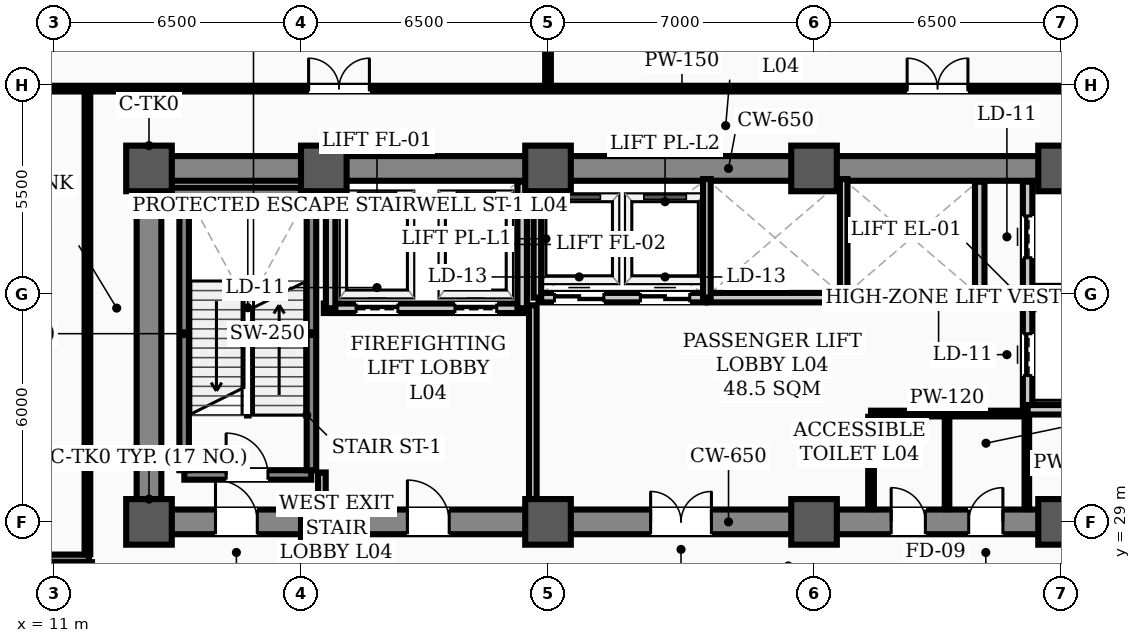
"""IFC4 building model, lengths in metres.
Left out: names, types, materials, properties, quantities, classifications, styles, units other than length and angle.
Written with IfcOpenShell. Run it as: python <this file> out.ifc"""

import sys

from ifc_helpers import new_model, si_unit, direction, frame, frame_2d, origin, origin_2d, place, context, subcontext, project, spatial, rectangle, hollow_rectangle, extrude, element, fill, save


model = new_model("IFC4")
c1 = context("Model", 3, precision=1e-05, world=origin(), true_north=direction((0.0, 1.0)))
c2 = subcontext(c1, "Body", "Model", "MODEL_VIEW")
j1 = project(units=[si_unit("LENGTHUNIT", "METRE"), si_unit("PLANEANGLEUNIT", "RADIAN")], contexts=[c1])
p1 = place(None, origin())
s1 = spatial("IfcSite", under=j1, at=p1, CompositionType="ELEMENT")
p2 = place(p1, origin())
s2 = spatial("IfcBuilding", under=s1, at=p2, CompositionType="ELEMENT")
p3 = place(p2, frame((0.0, 0.0, 16.6)))
s3 = spatial("IfcBuildingStorey", under=s2, at=p3, CompositionType="ELEMENT", Elevation=16.6)
for number, where, z_axis, x_axis in (
    (1, (13.5, 29.0, 0.0), (0.0, 0.0, 1.0), (1.0, 0.0, 0.0)),
    (2, (13.5, 38.3, 0.0), (0.0, 0.0, 1.0), (1.0, 0.0, 0.0)),
    (3, (18.1, 29.0, 0.0), (0.0, 0.0, 1.0), (1.0, 0.0, 0.0)),
    (4, (18.1, 38.3, 0.0), (0.0, 0.0, 1.0), (1.0, 0.0, 0.0)),
    (5, (24.0, 29.0, 0.0), (0.0, 0.0, 1.0), (1.0, 0.0, 0.0)),
    (6, (24.0, 38.3, 0.0), (0.0, 0.0, 1.0), (1.0, 0.0, 0.0)),
    (7, (31.0, 29.0, 0.0), (0.0, 0.0, 1.0), (1.0, 0.0, 0.0)),
    (8, (31.0, 38.3, 0.0), (0.0, 0.0, 1.0), (1.0, 0.0, 0.0)),
    (9, (37.5, 29.0, 0.0), (0.0, 0.0, 1.0), (1.0, 0.0, 0.0)),
    (10, (37.5, 38.3, 0.0), (0.0, 0.0, 1.0), (1.0, 0.0, 0.0)),
):
    element("IfcColumn", number, at=place(p3, frame(where, z_axis=z_axis, x_axis=x_axis)), inside=s3, PredefinedType="COLUMN", context=c2, shape_type="SweptSolid", body=[
        extrude(hollow_rectangle(XDim=1.2, YDim=1.2, WallThickness=0.04, InnerFilletRadius=0.02, OuterFilletRadius=0.06, at=origin_2d()), origin(), (0.0, 0.0, 1.0), 5.4),
    ])
p4 = place(p3, frame((13.5, 29.0, 0.0), z_axis=(0.0, 0.0, 1.0), x_axis=(1.0, 0.0, 0.0)))
e11 = element("IfcWall", 11, at=p4, inside=s3, PredefinedType="SHEAR", context=c2, shape_type="SweptSolid", body=[
    extrude(rectangle(XDim=30.5, YDim=0.65, at=frame_2d((15.25, 0.0))), origin(), (0.0, 0.0, 1.0), 5.16),
])
p5 = place(p4, frame((1.75, 0.0, 0.0)))
e12 = element("IfcOpeningElement", 12, at=p5, cuts=e11, PredefinedType="OPENING", context=c2, shape_type="SweptSolid", body=[
    extrude(rectangle(XDim=1.1, YDim=2.08, at=frame_2d((0.55, 1.04))), frame((0.0, 0.335, 0.0), z_axis=(0.0, -1.0, 0.0), x_axis=(1.0, 0.0, 0.0)), (0.0, 0.0, 1.0), 0.67),
])
p6 = place(p4, frame((26.7, 0.0, 0.0)))
e13 = element("IfcOpeningElement", 13, at=p6, cuts=e11, PredefinedType="OPENING", context=c2, shape_type="SweptSolid", body=[
    extrude(rectangle(XDim=1.1, YDim=2.08, at=frame_2d((0.55, 1.04))), frame((0.0, 0.335, 0.0), z_axis=(0.0, -1.0, 0.0), x_axis=(1.0, 0.0, 0.0)), (0.0, 0.0, 1.0), 0.67),
])
p7 = place(p4, frame((6.8, 0.0, 0.0)))
e14 = element("IfcOpeningElement", 14, at=p7, cuts=e11, PredefinedType="OPENING", context=c2, shape_type="SweptSolid", body=[
    extrude(rectangle(XDim=1.1, YDim=2.08, at=frame_2d((0.55, 1.04))), frame((0.0, 0.335, 0.0), z_axis=(0.0, -1.0, 0.0), x_axis=(1.0, 0.0, 0.0)), (0.0, 0.0, 1.0), 0.67),
])
p8 = place(p4, frame((13.2, 0.0, 0.0)))
e15 = element("IfcOpeningElement", 15, at=p8, cuts=e11, PredefinedType="OPENING", context=c2, shape_type="SweptSolid", body=[
    extrude(rectangle(XDim=1.6, YDim=2.08, at=frame_2d((0.8, 1.04))), frame((0.0, 0.335, 0.0), z_axis=(0.0, -1.0, 0.0), x_axis=(1.0, 0.0, 0.0)), (0.0, 0.0, 1.0), 0.67),
])
p9 = place(p4, frame((19.53, 0.0, 0.0)))
e16 = element("IfcOpeningElement", 16, at=p9, cuts=e11, PredefinedType="OPENING", context=c2, shape_type="SweptSolid", body=[
    extrude(rectangle(XDim=0.9, YDim=2.08, at=frame_2d((0.45, 1.04))), frame((0.0, 0.335, 0.0), z_axis=(0.0, -1.0, 0.0), x_axis=(1.0, 0.0, 0.0)), (0.0, 0.0, 1.0), 0.67),
])
p10 = place(p4, frame((21.57, 0.0, 0.0)))
e17 = element("IfcOpeningElement", 17, at=p10, cuts=e11, PredefinedType="OPENING", context=c2, shape_type="SweptSolid", body=[
    extrude(rectangle(XDim=0.9, YDim=2.08, at=frame_2d((0.45, 1.04))), frame((0.0, 0.335, 0.0), z_axis=(0.0, -1.0, 0.0), x_axis=(1.0, 0.0, 0.0)), (0.0, 0.0, 1.0), 0.67),
])
p11 = place(p3, frame((13.5, 38.3, 0.0), z_axis=(0.0, 0.0, 1.0), x_axis=(1.0, 0.0, 0.0)))
e18 = element("IfcWall", 18, at=p11, inside=s3, PredefinedType="SHEAR", context=c2, shape_type="SweptSolid", body=[
    extrude(rectangle(XDim=30.5, YDim=0.65, at=frame_2d((15.25, 0.0))), origin(), (0.0, 0.0, 1.0), 5.16),
])
p12 = place(p3, frame((13.5, 29.35, 0.0), z_axis=(0.0, 0.0, 1.0), x_axis=(0.0, 1.0, 0.0)))
e19 = element("IfcWall", 19, at=p12, inside=s3, PredefinedType="SHEAR", context=c2, shape_type="SweptSolid", body=[
    extrude(rectangle(XDim=8.6, YDim=0.65, at=frame_2d((4.3, 0.0))), origin(), (0.0, 0.0, 1.0), 5.16),
])
p13 = place(p3, frame((14.43, 30.235, 0.0), z_axis=(0.0, 0.0, 1.0), x_axis=(1.0, 0.0, 0.0)))
e20 = element("IfcWall", 20, at=p13, inside=s3, PredefinedType="STANDARD", context=c2, shape_type="SweptSolid", body=[
    extrude(rectangle(XDim=3.34, YDim=0.25, at=frame_2d((1.67, 0.0))), origin(), (0.0, 0.0, 1.0), 5.16),
])
p14 = place(p13, frame((1.1, 0.0, 0.0)))
e21 = element("IfcOpeningElement", 21, at=p14, cuts=e20, PredefinedType="OPENING", context=c2, shape_type="SweptSolid", body=[
    extrude(rectangle(XDim=1.1, YDim=2.08, at=frame_2d((0.55, 1.04))), frame((0.0, 0.135, 0.0), z_axis=(0.0, -1.0, 0.0), x_axis=(1.0, 0.0, 0.0)), (0.0, 0.0, 1.0), 0.27),
])
p15 = place(p3, frame((14.1, 37.669, 0.0), z_axis=(0.0, 0.0, 1.0), x_axis=(1.0, 0.0, 0.0)))
e22 = element("IfcWall", 22, at=p15, inside=s3, PredefinedType="STANDARD", context=c2, shape_type="SweptSolid", body=[
    extrude(rectangle(XDim=3.67, YDim=0.25, at=frame_2d((1.835, 0.0))), origin(), (0.0, 0.0, 1.0), 5.16),
])
for number, where, z_axis, x_axis in (
    (23, (14.425, 30.36, 0.0), (0.0, 0.0, 1.0), (0.0, 1.0, 0.0)),
    (24, (17.775, 30.36, 0.0), (0.0, 0.0, 1.0), (0.0, 1.0, 0.0)),
):
    element("IfcWall", number, at=place(p3, frame(where, z_axis=z_axis, x_axis=x_axis)), inside=s3, PredefinedType="STANDARD", context=c2, shape_type="SweptSolid", body=[
        extrude(rectangle(XDim=7.184, YDim=0.25, at=frame_2d((3.592, 0.0))), origin(), (0.0, 0.0, 1.0), 5.16),
    ])
p16 = place(p3, frame((18.1, 34.62, 0.0), z_axis=(0.0, 0.0, 1.0), x_axis=(1.0, 0.0, 0.0)))
e25 = element("IfcWall", 25, at=p16, inside=s3, PredefinedType="STANDARD", context=c2, shape_type="SweptSolid", body=[
    extrude(rectangle(XDim=5.35, YDim=0.25, at=frame_2d((2.675, 0.0))), origin(), (0.0, 0.0, 1.0), 5.16),
])
p17 = place(p16, frame((0.85, 0.0, 0.0)))
e26 = element("IfcOpeningElement", 26, at=p17, cuts=e25, PredefinedType="OPENING", context=c2, shape_type="SweptSolid", body=[
    extrude(rectangle(XDim=1.1, YDim=2.08, at=frame_2d((0.55, 1.04))), frame((0.0, 0.135, 0.0), z_axis=(0.0, -1.0, 0.0), x_axis=(1.0, 0.0, 0.0)), (0.0, 0.0, 1.0), 0.27),
])
p18 = place(p16, frame((3.45, 0.0, 0.0)))
e27 = element("IfcOpeningElement", 27, at=p18, cuts=e25, PredefinedType="OPENING", context=c2, shape_type="SweptSolid", body=[
    extrude(rectangle(XDim=1.1, YDim=2.08, at=frame_2d((0.55, 1.04))), frame((0.0, 0.135, 0.0), z_axis=(0.0, -1.0, 0.0), x_axis=(1.0, 0.0, 0.0)), (0.0, 0.0, 1.0), 0.27),
])
p19 = place(p3, frame((36.62, 31.95, 0.0), z_axis=(0.0, 0.0, 1.0), x_axis=(0.0, 1.0, 0.0)))
e28 = element("IfcWall", 28, at=p19, inside=s3, PredefinedType="STANDARD", context=c2, shape_type="SweptSolid", body=[
    extrude(rectangle(XDim=6.0, YDim=0.25, at=frame_2d((3.0, 0.0))), origin(), (0.0, 0.0, 1.0), 3.74),
])
p20 = place(p19, frame((0.9, 0.0, 0.0)))
e29 = element("IfcOpeningElement", 29, at=p20, cuts=e28, PredefinedType="OPENING", context=c2, shape_type="SweptSolid", body=[
    extrude(rectangle(XDim=1.1, YDim=2.08, at=frame_2d((0.55, 1.04))), frame((0.0, 0.135, 0.0), z_axis=(0.0, -1.0, 0.0), x_axis=(1.0, 0.0, 0.0)), (0.0, 0.0, 1.0), 0.27),
])
p21 = place(p19, frame((4.0, 0.0, 0.0)))
e30 = element("IfcOpeningElement", 30, at=p21, cuts=e28, PredefinedType="OPENING", context=c2, shape_type="SweptSolid", body=[
    extrude(rectangle(XDim=1.1, YDim=2.08, at=frame_2d((0.55, 1.04))), frame((0.0, 0.135, 0.0), z_axis=(0.0, -1.0, 0.0), x_axis=(1.0, 0.0, 0.0)), (0.0, 0.0, 1.0), 0.27),
])
p22 = place(p3, frame((36.62, 31.95, 0.0), z_axis=(0.0, 0.0, 1.0), x_axis=(1.0, 0.0, 0.0)))
e31 = element("IfcWall", 31, at=p22, inside=s3, PredefinedType="STANDARD", context=c2, shape_type="SweptSolid", body=[
    extrude(rectangle(XDim=1.9, YDim=0.25, at=frame_2d((0.95, 0.0))), origin(), (0.0, 0.0, 1.0), 4.98),
])
for number, where, z_axis, x_axis in (
    (32, (18.28, 34.62, 0.0), (0.0, 0.0, 1.0), (0.0, 1.0, 0.0)),
    (33, (23.32, 34.62, 0.0), (0.0, 0.0, 1.0), (0.0, 1.0, 0.0)),
):
    element("IfcWall", number, at=place(p3, frame(where, z_axis=z_axis, x_axis=x_axis)), inside=s3, PredefinedType="STANDARD", context=c2, shape_type="SweptSolid", body=[
        extrude(rectangle(XDim=3.33, YDim=0.25, at=frame_2d((1.665, 0.0))), origin(), (0.0, 0.0, 1.0), 3.74),
    ])
p23 = place(p3, frame((35.36, 34.9, 0.0), z_axis=(0.0, 0.0, 1.0), x_axis=(0.0, 1.0, 0.0)))
e34 = element("IfcWall", 34, at=p23, inside=s3, PredefinedType="STANDARD", context=c2, shape_type="SweptSolid", body=[
    extrude(rectangle(XDim=3.05, YDim=0.25, at=frame_2d((1.525, 0.0))), origin(), (0.0, 0.0, 1.0), 3.74),
])
p24 = place(p3, frame((23.75, 34.9, 0.0), z_axis=(0.0, 0.0, 1.0), x_axis=(1.0, 0.0, 0.0)))
e35 = element("IfcWall", 35, at=p24, inside=s3, PredefinedType="STANDARD", context=c2, shape_type="SweptSolid", body=[
    extrude(rectangle(XDim=4.4, YDim=0.25, at=frame_2d((2.2, 0.0))), origin(), (0.0, 0.0, 1.0), 5.16),
])
p25 = place(p24, frame((0.42, 0.0, 0.0)))
e36 = element("IfcOpeningElement", 36, at=p25, cuts=e35, PredefinedType="OPENING", context=c2, shape_type="SweptSolid", body=[
    extrude(rectangle(XDim=1.3, YDim=2.08, at=frame_2d((0.65, 1.04))), frame((0.0, 0.135, 0.0), z_axis=(0.0, -1.0, 0.0), x_axis=(1.0, 0.0, 0.0)), (0.0, 0.0, 1.0), 0.27),
])
p26 = place(p24, frame((2.68, 0.0, 0.0)))
e37 = element("IfcOpeningElement", 37, at=p26, cuts=e35, PredefinedType="OPENING", context=c2, shape_type="SweptSolid", body=[
    extrude(rectangle(XDim=1.3, YDim=2.08, at=frame_2d((0.65, 1.04))), frame((0.0, 0.135, 0.0), z_axis=(0.0, -1.0, 0.0), x_axis=(1.0, 0.0, 0.0)), (0.0, 0.0, 1.0), 0.27),
])
p27 = place(p3, frame((28.2, 34.9, 0.0), z_axis=(0.0, 0.0, 1.0), x_axis=(1.0, 0.0, 0.0)))
e38 = element("IfcWall", 38, at=p27, inside=s3, PredefinedType="STANDARD", context=c2, shape_type="SweptSolid", body=[
    extrude(rectangle(XDim=3.55, YDim=0.25, at=frame_2d((1.775, 0.0))), origin(), (0.0, 0.0, 1.0), 5.16),
])
p28 = place(p3, frame((31.8, 34.9, 0.0), z_axis=(0.0, 0.0, 1.0), x_axis=(1.0, 0.0, 0.0)))
e39 = element("IfcWall", 39, at=p28, inside=s3, PredefinedType="STANDARD", context=c2, shape_type="SweptSolid", body=[
    extrude(rectangle(XDim=3.6, YDim=0.25, at=frame_2d((1.8, 0.0))), origin(), (0.0, 0.0, 1.0), 5.16),
])
p29 = place(p3, frame((8.56, 28.04, 0.0), z_axis=(0.0, 0.0, 1.0), x_axis=(1.0, 0.0, 0.0)))
e40 = element("IfcWall", 40, at=p29, inside=s3, PredefinedType="STANDARD", context=c2, shape_type="SweptSolid", body=[
    extrude(rectangle(XDim=3.36, YDim=0.2, at=frame_2d((1.68, 0.0))), origin(), (0.0, 0.0, 1.0), 5.16),
])
p30 = place(p3, frame((11.9, 21.1, 0.0), z_axis=(0.0, 0.0, 1.0), x_axis=(0.0, 1.0, 0.0)))
e41 = element("IfcWall", 41, at=p30, inside=s3, PredefinedType="STANDARD", context=c2, shape_type="SweptSolid", body=[
    extrude(rectangle(XDim=6.84, YDim=0.2, at=frame_2d((3.42, 0.0))), origin(), (0.0, 0.0, 1.0), 5.16),
])
p31 = place(p3, frame((0.58, 40.4, 0.0), z_axis=(0.0, 0.0, 1.0), x_axis=(1.0, 0.0, 0.0)))
e42 = element("IfcWall", 42, at=p31, inside=s3, PredefinedType="PARTITIONING", context=c2, shape_type="SweptSolid", body=[
    extrude(rectangle(XDim=53.89, YDim=0.15, at=frame_2d((26.945, 0.0))), origin(), (0.0, 0.0, 1.0), 3.74),
])
p32 = place(p31, frame((17.12, 0.0, 0.0)))
e43 = element("IfcOpeningElement", 43, at=p32, cuts=e42, PredefinedType="OPENING", context=c2, shape_type="SweptSolid", body=[
    extrude(rectangle(XDim=1.6, YDim=2.08, at=frame_2d((0.8, 1.04))), frame((0.0, 0.085, 0.0), z_axis=(0.0, -1.0, 0.0), x_axis=(1.0, 0.0, 0.0)), (0.0, 0.0, 1.0), 0.17),
])
p33 = place(p31, frame((32.87, 0.0, 0.0)))
e44 = element("IfcOpeningElement", 44, at=p33, cuts=e42, PredefinedType="OPENING", context=c2, shape_type="SweptSolid", body=[
    extrude(rectangle(XDim=1.6, YDim=2.08, at=frame_2d((0.8, 1.04))), frame((0.0, 0.085, 0.0), z_axis=(0.0, -1.0, 0.0), x_axis=(1.0, 0.0, 0.0)), (0.0, 0.0, 1.0), 0.17),
])
p34 = place(p3, frame((32.5, 31.85, 0.0), z_axis=(0.0, 0.0, 1.0), x_axis=(1.0, 0.0, 0.0)))
e45 = element("IfcWall", 45, at=p34, inside=s3, PredefinedType="PARTITIONING", context=c2, shape_type="SweptSolid", body=[
    extrude(rectangle(XDim=4.1, YDim=0.15, at=frame_2d((2.05, 0.0))), origin(), (0.0, 0.0, 1.0), 5.16),
])
p35 = place(p3, frame((11.88, 28.15, 0.0), z_axis=(0.0, 0.0, 1.0), x_axis=(0.0, 1.0, 0.0)))
e46 = element("IfcWall", 46, at=p35, inside=s3, PredefinedType="PARTITIONING", context=c2, shape_type="SweptSolid", body=[
    extrude(rectangle(XDim=12.165, YDim=0.15, at=frame_2d((6.083, 0.0))), origin(), (0.0, 0.0, 1.0), 3.74),
])
p36 = place(p3, frame((24.0, 40.485, 0.0), z_axis=(0.0, 0.0, 1.0), x_axis=(0.0, 1.0, 0.0)))
e47 = element("IfcWall", 47, at=p36, inside=s3, PredefinedType="PARTITIONING", context=c2, shape_type="SweptSolid", body=[
    extrude(rectangle(XDim=7.935, YDim=0.15, at=frame_2d((3.967, 0.0))), origin(), (0.0, 0.0, 1.0), 3.74),
])
p37 = place(p3, frame((18.05, 29.335, 0.0), z_axis=(0.0, 0.0, 1.0), x_axis=(0.0, 1.0, 0.0)))
e48 = element("IfcWall", 48, at=p37, inside=s3, PredefinedType="STANDARD", context=c2, shape_type="SweptSolid", body=[
    extrude(rectangle(XDim=0.965, YDim=0.2, at=frame_2d((0.482, 0.0))), origin(), (0.0, 0.0, 1.0), 3.74),
])
p38 = place(p3, frame((23.6, 29.335, 0.0), z_axis=(0.0, 0.0, 1.0), x_axis=(0.0, 1.0, 0.0)))
e49 = element("IfcWall", 49, at=p38, inside=s3, PredefinedType="STANDARD", context=c2, shape_type="SweptSolid", body=[
    extrude(rectangle(XDim=5.365, YDim=0.2, at=frame_2d((2.683, 0.0))), origin(), (0.0, 0.0, 1.0), 3.74),
])
p39 = place(p3, frame((32.5, 29.335, 0.0), z_axis=(0.0, 0.0, 1.0), x_axis=(0.0, 1.0, 0.0)))
e50 = element("IfcWall", 50, at=p39, inside=s3, PredefinedType="PARTITIONING", context=c2, shape_type="SweptSolid", body=[
    extrude(rectangle(XDim=2.43, YDim=0.15, at=frame_2d((1.215, 0.0))), origin(), (0.0, 0.0, 1.0), 3.74),
])
for number, where, z_axis, x_axis in (
    (51, (36.6, 29.335, 0.0), (0.0, 0.0, 1.0), (0.0, 1.0, 0.0)),
    (52, (34.5, 29.335, 0.0), (0.0, 0.0, 1.0), (0.0, 1.0, 0.0)),
):
    element("IfcWall", number, at=place(p3, frame(where, z_axis=z_axis, x_axis=x_axis)), inside=s3, PredefinedType="PARTITIONING", context=c2, shape_type="SweptSolid", body=[
        extrude(rectangle(XDim=2.43, YDim=0.12, at=frame_2d((1.215, 0.0))), origin(), (0.0, 0.0, 1.0), 3.74),
    ])
for number, where, z_axis, x_axis in (
    (53, (23.72, 34.9, 0.0), (0.0, 0.0, 1.0), (0.0, 1.0, 0.0)),
    (54, (28.18, 34.9, 0.0), (0.0, 0.0, 1.0), (0.0, 1.0, 0.0)),
    (55, (31.78, 34.9, 0.0), (0.0, 0.0, 1.0), (0.0, 1.0, 0.0)),
):
    element("IfcWall", number, at=place(p3, frame(where, z_axis=z_axis, x_axis=x_axis)), inside=s3, PredefinedType="STANDARD", context=c2, shape_type="SweptSolid", body=[
        extrude(rectangle(XDim=3.12, YDim=0.2, at=frame_2d((1.56, 0.0))), origin(), (0.0, 0.0, 1.0), 3.74),
    ])
p40 = place(p14, origin())
e56 = element("IfcDoor", 56, at=p40, inside=s3, OperationType="SINGLE_SWING_LEFT", PredefinedType="DOOR", context=c2, shape_type="SweptSolid", body=[
    extrude(rectangle(XDim=1.1, YDim=2.08, at=frame_2d((0.55, 1.04))), frame((0.0, 0.025, 0.0), z_axis=(0.0, -1.0, 0.0), x_axis=(1.0, 0.0, 0.0)), (0.0, 0.0, 1.0), 0.05),
])
fill(e21, e56)
p41 = place(p32, origin())
e57 = element("IfcDoor", 57, at=p41, inside=s3, OperationType="DOUBLE_DOOR_SINGLE_SWING", PredefinedType="DOOR", context=c2, shape_type="SweptSolid", body=[
    extrude(rectangle(XDim=1.6, YDim=2.08, at=frame_2d((0.8, 1.04))), frame((0.0, 0.025, 0.0), z_axis=(0.0, -1.0, 0.0), x_axis=(1.0, 0.0, 0.0)), (0.0, 0.0, 1.0), 0.05),
])
fill(e43, e57)
p42 = place(p33, origin())
e58 = element("IfcDoor", 58, at=p42, inside=s3, OperationType="DOUBLE_DOOR_SINGLE_SWING", PredefinedType="DOOR", context=c2, shape_type="SweptSolid", body=[
    extrude(rectangle(XDim=1.6, YDim=2.08, at=frame_2d((0.8, 1.04))), frame((0.0, 0.025, 0.0), z_axis=(0.0, -1.0, 0.0), x_axis=(1.0, 0.0, 0.0)), (0.0, 0.0, 1.0), 0.05),
])
fill(e44, e58)
p43 = place(p5, origin())
e59 = element("IfcDoor", 59, at=p43, inside=s3, OperationType="SINGLE_SWING_LEFT", PredefinedType="DOOR", context=c2, shape_type="SweptSolid", body=[
    extrude(rectangle(XDim=1.1, YDim=2.08, at=frame_2d((0.55, 1.04))), frame((0.0, 0.025, 0.0), z_axis=(0.0, -1.0, 0.0), x_axis=(1.0, 0.0, 0.0)), (0.0, 0.0, 1.0), 0.05),
])
fill(e12, e59)
p44 = place(p7, origin())
e60 = element("IfcDoor", 60, at=p44, inside=s3, OperationType="SINGLE_SWING_LEFT", PredefinedType="DOOR", context=c2, shape_type="SweptSolid", body=[
    extrude(rectangle(XDim=1.1, YDim=2.08, at=frame_2d((0.55, 1.04))), frame((0.0, 0.025, 0.0), z_axis=(0.0, -1.0, 0.0), x_axis=(1.0, 0.0, 0.0)), (0.0, 0.0, 1.0), 0.05),
])
fill(e14, e60)
p45 = place(p8, origin())
e61 = element("IfcDoor", 61, at=p45, inside=s3, OperationType="DOUBLE_DOOR_SINGLE_SWING", PredefinedType="DOOR", context=c2, shape_type="SweptSolid", body=[
    extrude(rectangle(XDim=1.6, YDim=2.08, at=frame_2d((0.8, 1.04))), frame((0.0, 0.025, 0.0), z_axis=(0.0, -1.0, 0.0), x_axis=(1.0, 0.0, 0.0)), (0.0, 0.0, 1.0), 0.05),
])
fill(e15, e61)
p46 = place(p9, origin())
e62 = element("IfcDoor", 62, at=p46, inside=s3, OperationType="SINGLE_SWING_LEFT", PredefinedType="DOOR", context=c2, shape_type="SweptSolid", body=[
    extrude(rectangle(XDim=0.9, YDim=2.08, at=frame_2d((0.45, 1.04))), frame((0.0, 0.025, 0.0), z_axis=(0.0, -1.0, 0.0), x_axis=(1.0, 0.0, 0.0)), (0.0, 0.0, 1.0), 0.05),
])
fill(e16, e62)
p47 = place(p10, origin())
e63 = element("IfcDoor", 63, at=p47, inside=s3, OperationType="SINGLE_SWING_RIGHT", PredefinedType="DOOR", context=c2, shape_type="SweptSolid", body=[
    extrude(rectangle(XDim=0.9, YDim=2.08, at=frame_2d((0.45, 1.04))), frame((0.0, 0.025, 0.0), z_axis=(0.0, -1.0, 0.0), x_axis=(1.0, 0.0, 0.0)), (0.0, 0.0, 1.0), 0.05),
])
fill(e17, e63)
p48 = place(p17, origin())
e64 = element("IfcDoor", 64, at=p48, inside=s3, OperationType="SLIDING_TO_LEFT", PredefinedType="DOOR", context=c2, shape_type="SweptSolid", body=[
    extrude(rectangle(XDim=1.1, YDim=2.08, at=frame_2d((0.55, 1.04))), frame((0.0, 0.025, 0.0), z_axis=(0.0, -1.0, 0.0), x_axis=(1.0, 0.0, 0.0)), (0.0, 0.0, 1.0), 0.05),
])
fill(e26, e64)
p49 = place(p18, origin())
e65 = element("IfcDoor", 65, at=p49, inside=s3, OperationType="SLIDING_TO_LEFT", PredefinedType="DOOR", context=c2, shape_type="SweptSolid", body=[
    extrude(rectangle(XDim=1.1, YDim=2.08, at=frame_2d((0.55, 1.04))), frame((0.0, 0.025, 0.0), z_axis=(0.0, -1.0, 0.0), x_axis=(1.0, 0.0, 0.0)), (0.0, 0.0, 1.0), 0.05),
])
fill(e27, e65)
p50 = place(p20, origin())
e66 = element("IfcDoor", 66, at=p50, inside=s3, OperationType="SLIDING_TO_LEFT", PredefinedType="DOOR", context=c2, shape_type="SweptSolid", body=[
    extrude(rectangle(XDim=1.1, YDim=2.08, at=frame_2d((0.55, 1.04))), frame((0.0, 0.025, 0.0), z_axis=(0.0, -1.0, 0.0), x_axis=(1.0, 0.0, 0.0)), (0.0, 0.0, 1.0), 0.05),
])
fill(e29, e66)
p51 = place(p21, origin())
e67 = element("IfcDoor", 67, at=p51, inside=s3, OperationType="SLIDING_TO_LEFT", PredefinedType="DOOR", context=c2, shape_type="SweptSolid", body=[
    extrude(rectangle(XDim=1.1, YDim=2.08, at=frame_2d((0.55, 1.04))), frame((0.0, 0.025, 0.0), z_axis=(0.0, -1.0, 0.0), x_axis=(1.0, 0.0, 0.0)), (0.0, 0.0, 1.0), 0.05),
])
fill(e30, e67)
p52 = place(p25, origin())
e68 = element("IfcDoor", 68, at=p52, inside=s3, OperationType="DOUBLE_DOOR_SLIDING", PredefinedType="DOOR", context=c2, shape_type="SweptSolid", body=[
    extrude(rectangle(XDim=1.3, YDim=2.08, at=frame_2d((0.65, 1.04))), frame((0.0, 0.025, 0.0), z_axis=(0.0, -1.0, 0.0), x_axis=(1.0, 0.0, 0.0)), (0.0, 0.0, 1.0), 0.05),
])
fill(e36, e68)
p53 = place(p26, origin())
e69 = element("IfcDoor", 69, at=p53, inside=s3, OperationType="DOUBLE_DOOR_SLIDING", PredefinedType="DOOR", context=c2, shape_type="SweptSolid", body=[
    extrude(rectangle(XDim=1.3, YDim=2.08, at=frame_2d((0.65, 1.04))), frame((0.0, 0.025, 0.0), z_axis=(0.0, -1.0, 0.0), x_axis=(1.0, 0.0, 0.0)), (0.0, 0.0, 1.0), 0.05),
])
fill(e37, e69)
save(model, sys.argv[1])
